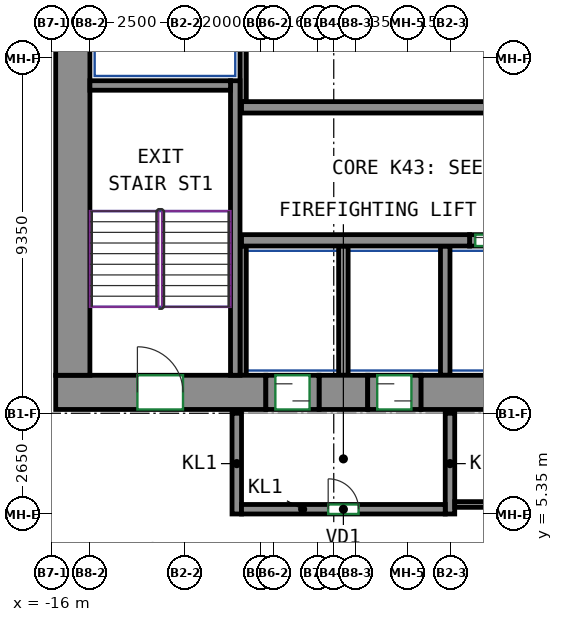
"""IFC4 building model, lengths in metres.
Left out: names, types, materials, properties, quantities, classifications, styles, units other than length and angle.
Written with IfcOpenShell. Run it as: python <this file> out.ifc"""

import sys

from ifc_helpers import new_model, si_unit, direction, frame, frame_2d, origin, place, context, subcontext, project, spatial, rectangle, extrude, source, transform, mapped, element, fill, save


model = new_model("IFC4")
c1 = context("Model", 3, precision=1e-05, world=origin(), true_north=direction((0.0, 1.0)))
c2 = subcontext(c1, "Body", "Model", "MODEL_VIEW")
j1 = project(units=[si_unit("LENGTHUNIT", "METRE"), si_unit("PLANEANGLEUNIT", "RADIAN")], contexts=[c1])
p1 = place(None, origin())
s1 = spatial("IfcSite", under=j1, at=p1, CompositionType="ELEMENT")
p2 = place(p1, origin())
s2 = spatial("IfcBuilding", under=s1, at=p2, CompositionType="ELEMENT")
p3 = place(p2, frame((0.0, 0.0, 178.7)))
s3 = spatial("IfcBuildingStorey", under=s2, at=p3, CompositionType="ELEMENT", Elevation=178.7)
m1 = source(origin(), c2, "Body", "SweptSolid", [
    extrude(rectangle(XDim=5.53, YDim=0.9, at=frame_2d((2.765, 0.0))), origin(), (0.0, 0.0, 1.0), 3.12),
])
p4 = place(p3, frame((-15.9, 8.55, 0.0), z_axis=(0.0, 0.0, 1.0), x_axis=(1.0, 0.0, 0.0)))
e1 = element("IfcWall", 1, at=p4, inside=s3, PredefinedType="SHEAR", context=c2, shape_type="MappedRepresentation", body=[
    mapped(m1, transform((0.0, 0.0, 0.0))),
])
p5 = place(p4, frame((2.15, 0.0, 0.0)))
e2 = element("IfcOpeningElement", 2, at=p5, cuts=e1, PredefinedType="OPENING", context=c2, shape_type="SweptSolid", body=[
    extrude(rectangle(XDim=1.2, YDim=2.1, at=frame_2d((0.6, 1.05))), frame((0.0, 0.46, 0.0), z_axis=(0.0, -1.0, 0.0), x_axis=(1.0, 0.0, 0.0)), (0.0, 0.0, 1.0), 0.92),
])
m2 = source(origin(), c2, "Body", "SweptSolid", [
    extrude(rectangle(XDim=1.28, YDim=0.9, at=frame_2d((0.64, 0.0))), origin(), (0.0, 0.0, 1.0), 3.12),
])
p6 = place(p3, frame((-8.97, 8.55, 0.0), z_axis=(0.0, 0.0, 1.0), x_axis=(1.0, 0.0, 0.0)))
e3 = element("IfcWall", 3, at=p6, inside=s3, PredefinedType="SHEAR", context=c2, shape_type="MappedRepresentation", body=[
    mapped(m2, transform((0.0, 0.0, 0.0))),
])
m3 = source(origin(), c2, "Body", "SweptSolid", [
    extrude(rectangle(XDim=14.18, YDim=0.9, at=frame_2d((7.09, 0.0))), origin(), (0.0, 0.0, 1.0), 3.12),
])
p7 = place(p3, frame((-6.29, 8.55, 0.0), z_axis=(0.0, 0.0, 1.0), x_axis=(1.0, 0.0, 0.0)))
e4 = element("IfcWall", 4, at=p7, inside=s3, PredefinedType="SHEAR", context=c2, shape_type="MappedRepresentation", body=[
    mapped(m3, transform((0.0, 0.0, 0.0))),
])
m4 = source(origin(), c2, "Body", "SweptSolid", [
    extrude(rectangle(XDim=12.0, YDim=0.9, at=frame_2d((6.0, 0.0))), origin(), (0.0, 0.0, 1.0), 3.12),
])
p8 = place(p3, frame((-15.45, 9.0, 0.0), z_axis=(0.0, 0.0, 1.0), x_axis=(0.0, 1.0, 0.0)))
e5 = element("IfcWall", 5, at=p8, inside=s3, PredefinedType="SHEAR", context=c2, shape_type="MappedRepresentation", body=[
    mapped(m4, transform((0.0, 0.0, 0.0))),
])
m5 = source(origin(), c2, "Body", "SweptSolid", [
    extrude(rectangle(XDim=7.75, YDim=0.25, at=frame_2d((3.875, 0.0))), origin(), (0.0, 0.0, 1.0), 3.12),
])
p9 = place(p3, frame((-11.175, 9.0, 0.0), z_axis=(0.0, 0.0, 1.0), x_axis=(0.0, 1.0, 0.0)))
e6 = element("IfcWall", 6, at=p9, inside=s3, PredefinedType="SHEAR", context=c2, shape_type="MappedRepresentation", body=[
    mapped(m5, transform((0.0, 0.0, 0.0))),
])
m6 = source(origin(), c2, "Body", "SweptSolid", [
    extrude(rectangle(XDim=3.7, YDim=0.25, at=frame_2d((1.85, 0.0))), origin(), (0.0, 0.0, 1.0), 3.12),
])
p10 = place(p3, frame((-15.0, 16.625, 0.0), z_axis=(0.0, 0.0, 1.0), x_axis=(1.0, 0.0, 0.0)))
e7 = element("IfcWall", 7, at=p10, inside=s3, PredefinedType="SHEAR", context=c2, shape_type="MappedRepresentation", body=[
    mapped(m6, transform((0.0, 0.0, 0.0))),
])
m7 = source(origin(), c2, "Body", "SweptSolid", [
    extrude(rectangle(XDim=6.0, YDim=0.3, at=frame_2d((3.0, 0.0))), origin(), (0.0, 0.0, 1.0), 3.12),
])
p11 = place(p3, frame((-11.01, 12.55, 0.0), z_axis=(0.0, 0.0, 1.0), x_axis=(1.0, 0.0, 0.0)))
e8 = element("IfcWall", 8, at=p11, inside=s3, PredefinedType="SHEAR", context=c2, shape_type="MappedRepresentation", body=[
    mapped(m7, transform((0.0, 0.0, 0.0))),
])
m8 = source(origin(), c2, "Body", "SweptSolid", [
    extrude(rectangle(XDim=14.04, YDim=0.3, at=frame_2d((7.02, 0.0))), origin(), (0.0, 0.0, 1.0), 3.12),
])
p12 = place(p3, frame((-11.01, 16.05, 0.0), z_axis=(0.0, 0.0, 1.0), x_axis=(1.0, 0.0, 0.0)))
e9 = element("IfcWall", 9, at=p12, inside=s3, PredefinedType="SHEAR", context=c2, shape_type="MappedRepresentation", body=[
    mapped(m8, transform((0.0, 0.0, 0.0))),
])
m9 = source(origin(), c2, "Body", "SweptSolid", [
    extrude(rectangle(XDim=1.4, YDim=0.3, at=frame_2d((0.7, 0.0))), origin(), (0.0, 0.0, 1.0), 3.12),
])
p13 = place(p3, frame((-5.01, 12.55, 0.0), z_axis=(0.0, 0.0, 1.0), x_axis=(1.0, 0.0, 0.0)))
e10 = element("IfcWall", 10, at=p13, inside=s3, PredefinedType="PARTITIONING", context=c2, shape_type="MappedRepresentation", body=[
    mapped(m9, transform((0.0, 0.0, 0.0))),
])
p14 = place(p13, frame((0.15, 0.0, 0.0)))
e11 = element("IfcOpeningElement", 11, at=p14, cuts=e10, PredefinedType="OPENING", context=c2, shape_type="SweptSolid", body=[
    extrude(rectangle(XDim=1.1, YDim=2.1, at=frame_2d((0.55, 1.05))), frame((0.0, 0.16, 0.0), z_axis=(0.0, -1.0, 0.0), x_axis=(1.0, 0.0, 0.0)), (0.0, 0.0, 1.0), 0.32),
])
m10 = source(origin(), c2, "Body", "SweptSolid", [
    extrude(rectangle(XDim=2.65, YDim=0.25, at=frame_2d((1.325, 0.0))), origin(), (0.0, 0.0, 1.0), 3.12),
])
for number, where, z_axis, x_axis in (
    (12, (-11.135, 5.35, 0.0), (0.0, 0.0, 1.0), (0.0, 1.0, 0.0)),
    (13, (-5.525, 5.35, 0.0), (0.0, 0.0, 1.0), (0.0, 1.0, 0.0)),
):
    element("IfcWall", number, at=place(p3, frame(where, z_axis=z_axis, x_axis=x_axis)), inside=s3, PredefinedType="PARTITIONING", context=c2, shape_type="MappedRepresentation", body=[
        mapped(m10, transform((0.0, 0.0, 0.0))),
    ])
m11 = source(origin(), c2, "Body", "SweptSolid", [
    extrude(rectangle(XDim=5.36, YDim=0.25, at=frame_2d((2.68, 0.0))), origin(), (0.0, 0.0, 1.0), 3.12),
])
p15 = place(p3, frame((-11.01, 5.475, 0.0), z_axis=(0.0, 0.0, 1.0), x_axis=(1.0, 0.0, 0.0)))
e14 = element("IfcWall", 14, at=p15, inside=s3, PredefinedType="PARTITIONING", context=c2, shape_type="MappedRepresentation", body=[
    mapped(m11, transform((0.0, 0.0, 0.0))),
])
p16 = place(p15, frame((2.28, 0.0, 0.0)))
e15 = element("IfcOpeningElement", 15, at=p16, cuts=e14, PredefinedType="OPENING", context=c2, shape_type="SweptSolid", body=[
    extrude(rectangle(XDim=0.8, YDim=2.0, at=frame_2d((0.4, 1.0))), frame((0.0, 0.135, 0.0), z_axis=(0.0, -1.0, 0.0), x_axis=(1.0, 0.0, 0.0)), (0.0, 0.0, 1.0), 0.27),
])
m12 = source(origin(), c2, "Body", "SweptSolid", [
    extrude(rectangle(XDim=4.8, YDim=0.165, at=frame_2d((2.4, 0.0))), origin(), (0.0, 0.0, 1.0), 3.12),
])
p17 = place(p3, frame((-10.968, 16.2, 0.0), z_axis=(0.0, 0.0, 1.0), x_axis=(0.0, 1.0, 0.0)))
e16 = element("IfcWall", 16, at=p17, inside=s3, PredefinedType="PARTITIONING", context=c2, shape_type="MappedRepresentation", body=[
    mapped(m12, transform((0.0, 0.0, 0.0))),
])
m13 = source(origin(), c2, "Body", "SweptSolid", [
    extrude(rectangle(XDim=3.4, YDim=0.165, at=frame_2d((1.7, 0.0))), origin(), (0.0, 0.0, 1.0), 3.12),
])
p18 = place(p3, frame((-10.968, 9.0, 0.0), z_axis=(0.0, 0.0, 1.0), x_axis=(0.0, 1.0, 0.0)))
e17 = element("IfcWall", 17, at=p18, inside=s3, PredefinedType="PARTITIONING", context=c2, shape_type="MappedRepresentation", body=[
    mapped(m13, transform((0.0, 0.0, 0.0))),
])
m14 = source(origin(), c2, "Body", "SweptSolid", [
    extrude(rectangle(XDim=3.4, YDim=0.25, at=frame_2d((1.7, 0.0))), origin(), (0.0, 0.0, 1.0), 3.12),
])
for number, where, z_axis, x_axis in (
    (18, (-5.65, 9.0, 0.0), (0.0, 0.0, 1.0), (0.0, 1.0, 0.0)),
    (19, (-8.33, 9.0, 0.0), (0.0, 0.0, 1.0), (0.0, 1.0, 0.0)),
):
    element("IfcWall", number, at=place(p3, frame(where, z_axis=z_axis, x_axis=x_axis)), inside=s3, PredefinedType="PARTITIONING", context=c2, shape_type="MappedRepresentation", body=[
        mapped(m14, transform((0.0, 0.0, 0.0))),
    ])
m15 = source(origin(), c2, "Body", "SweptSolid", [
    extrude(rectangle(XDim=1.4, YDim=0.9, at=frame_2d((0.7, 0.0))), origin(), (0.0, 0.0, 1.0), 2.7),
])
p19 = place(p3, frame((-10.37, 8.55, 0.0), z_axis=(0.0, 0.0, 1.0), x_axis=(1.0, 0.0, 0.0)))
e20 = element("IfcWall", 20, at=p19, inside=s3, PredefinedType="PARTITIONING", context=c2, shape_type="MappedRepresentation", body=[
    mapped(m15, transform((0.0, 0.0, 0.0))),
])
p20 = place(p19, frame((0.25, 0.0, 0.0)))
e21 = element("IfcOpeningElement", 21, at=p20, cuts=e20, PredefinedType="OPENING", context=c2, shape_type="SweptSolid", body=[
    extrude(rectangle(XDim=0.9, YDim=2.1, at=frame_2d((0.45, 1.05))), frame((0.0, 0.46, 0.0), z_axis=(0.0, -1.0, 0.0), x_axis=(1.0, 0.0, 0.0)), (0.0, 0.0, 1.0), 0.92),
])
m16 = source(origin(), c2, "Body", "SweptSolid", [
    extrude(rectangle(XDim=1.4, YDim=0.9, at=frame_2d((0.7, 0.0))), origin(), (0.0, 0.0, 1.0), 2.7),
])
p21 = place(p3, frame((-7.69, 8.55, 0.0), z_axis=(0.0, 0.0, 1.0), x_axis=(1.0, 0.0, 0.0)))
e22 = element("IfcWall", 22, at=p21, inside=s3, PredefinedType="PARTITIONING", context=c2, shape_type="MappedRepresentation", body=[
    mapped(m16, transform((0.0, 0.0, 0.0))),
])
p22 = place(p21, frame((0.25, 0.0, 0.0)))
e23 = element("IfcOpeningElement", 23, at=p22, cuts=e22, PredefinedType="OPENING", context=c2, shape_type="SweptSolid", body=[
    extrude(rectangle(XDim=0.9, YDim=2.1, at=frame_2d((0.45, 1.05))), frame((0.0, 0.46, 0.0), z_axis=(0.0, -1.0, 0.0), x_axis=(1.0, 0.0, 0.0)), (0.0, 0.0, 1.0), 0.92),
])
p23 = place(p3, frame((7.875, 5.6, 0.0), z_axis=(0.0, 0.0, 1.0), x_axis=(-1.0, 0.0, 0.0)))
e24 = element("IfcWall", 24, at=p23, inside=s3, PredefinedType="PARTITIONING", context=c2, shape_type="SweptSolid", body=[
    extrude(rectangle(XDim=13.275, YDim=0.15, at=frame_2d((6.637, 0.0))), origin(), (0.0, 0.0, 1.0), 3.12),
])
p24 = place(p23, frame((1.609, 0.0, 0.0)))
e25 = element("IfcOpeningElement", 25, at=p24, cuts=e24, PredefinedType="OPENING", context=c2, shape_type="SweptSolid", body=[
    extrude(rectangle(XDim=1.0, YDim=2.1, at=frame_2d((0.5, 1.05))), frame((0.0, 0.085, 0.0), z_axis=(0.0, -1.0, 0.0), x_axis=(1.0, 0.0, 0.0)), (0.0, 0.0, 1.0), 0.17),
])
p25 = place(p16, origin())
e26 = element("IfcDoor", 26, at=p25, inside=s3, OperationType="SINGLE_SWING_LEFT", PredefinedType="DOOR", context=c2, shape_type="SweptSolid", body=[
    extrude(rectangle(XDim=0.8, YDim=2.0, at=frame_2d((0.4, 1.0))), frame((0.0, 0.025, 0.0), z_axis=(0.0, -1.0, 0.0), x_axis=(1.0, 0.0, 0.0)), (0.0, 0.0, 1.0), 0.05),
])
fill(e15, e26)
p26 = place(p20, origin())
e27 = element("IfcDoor", 27, at=p26, inside=s3, OperationType="SLIDING_TO_LEFT", PredefinedType="DOOR", context=c2, shape_type="SweptSolid", body=[
    extrude(rectangle(XDim=0.9, YDim=2.1, at=frame_2d((0.45, 1.05))), frame((0.0, 0.355, 0.0), z_axis=(0.0, -1.0, 0.0), x_axis=(1.0, 0.0, 0.0)), (0.0, 0.0, 1.0), 0.05),
])
fill(e21, e27)
p27 = place(p22, origin())
e28 = element("IfcDoor", 28, at=p27, inside=s3, OperationType="SLIDING_TO_RIGHT", PredefinedType="DOOR", context=c2, shape_type="SweptSolid", body=[
    extrude(rectangle(XDim=0.9, YDim=2.1, at=frame_2d((0.45, 1.05))), frame((0.0, 0.355, 0.0), z_axis=(0.0, -1.0, 0.0), x_axis=(1.0, 0.0, 0.0)), (0.0, 0.0, 1.0), 0.05),
])
fill(e23, e28)
p28 = place(p14, origin())
e29 = element("IfcDoor", 29, at=p28, inside=s3, OperationType="DOUBLE_DOOR_SLIDING", PredefinedType="DOOR", context=c2, shape_type="SweptSolid", body=[
    extrude(rectangle(XDim=1.1, YDim=2.1, at=frame_2d((0.55, 1.05))), frame((0.0, 0.025, 0.0), z_axis=(0.0, -1.0, 0.0), x_axis=(1.0, 0.0, 0.0)), (0.0, 0.0, 1.0), 0.05),
])
fill(e11, e29)
p29 = place(p5, origin())
e30 = element("IfcDoor", 30, at=p29, inside=s3, OperationType="DOUBLE_DOOR_SINGLE_SWING", PredefinedType="DOOR", context=c2, shape_type="SweptSolid", body=[
    extrude(rectangle(XDim=1.2, YDim=2.1, at=frame_2d((0.6, 1.05))), frame((0.0, 0.355, 0.0), z_axis=(0.0, -1.0, 0.0), x_axis=(1.0, 0.0, 0.0)), (0.0, 0.0, 1.0), 0.05),
])
fill(e2, e30)
save(model, sys.argv[1])
